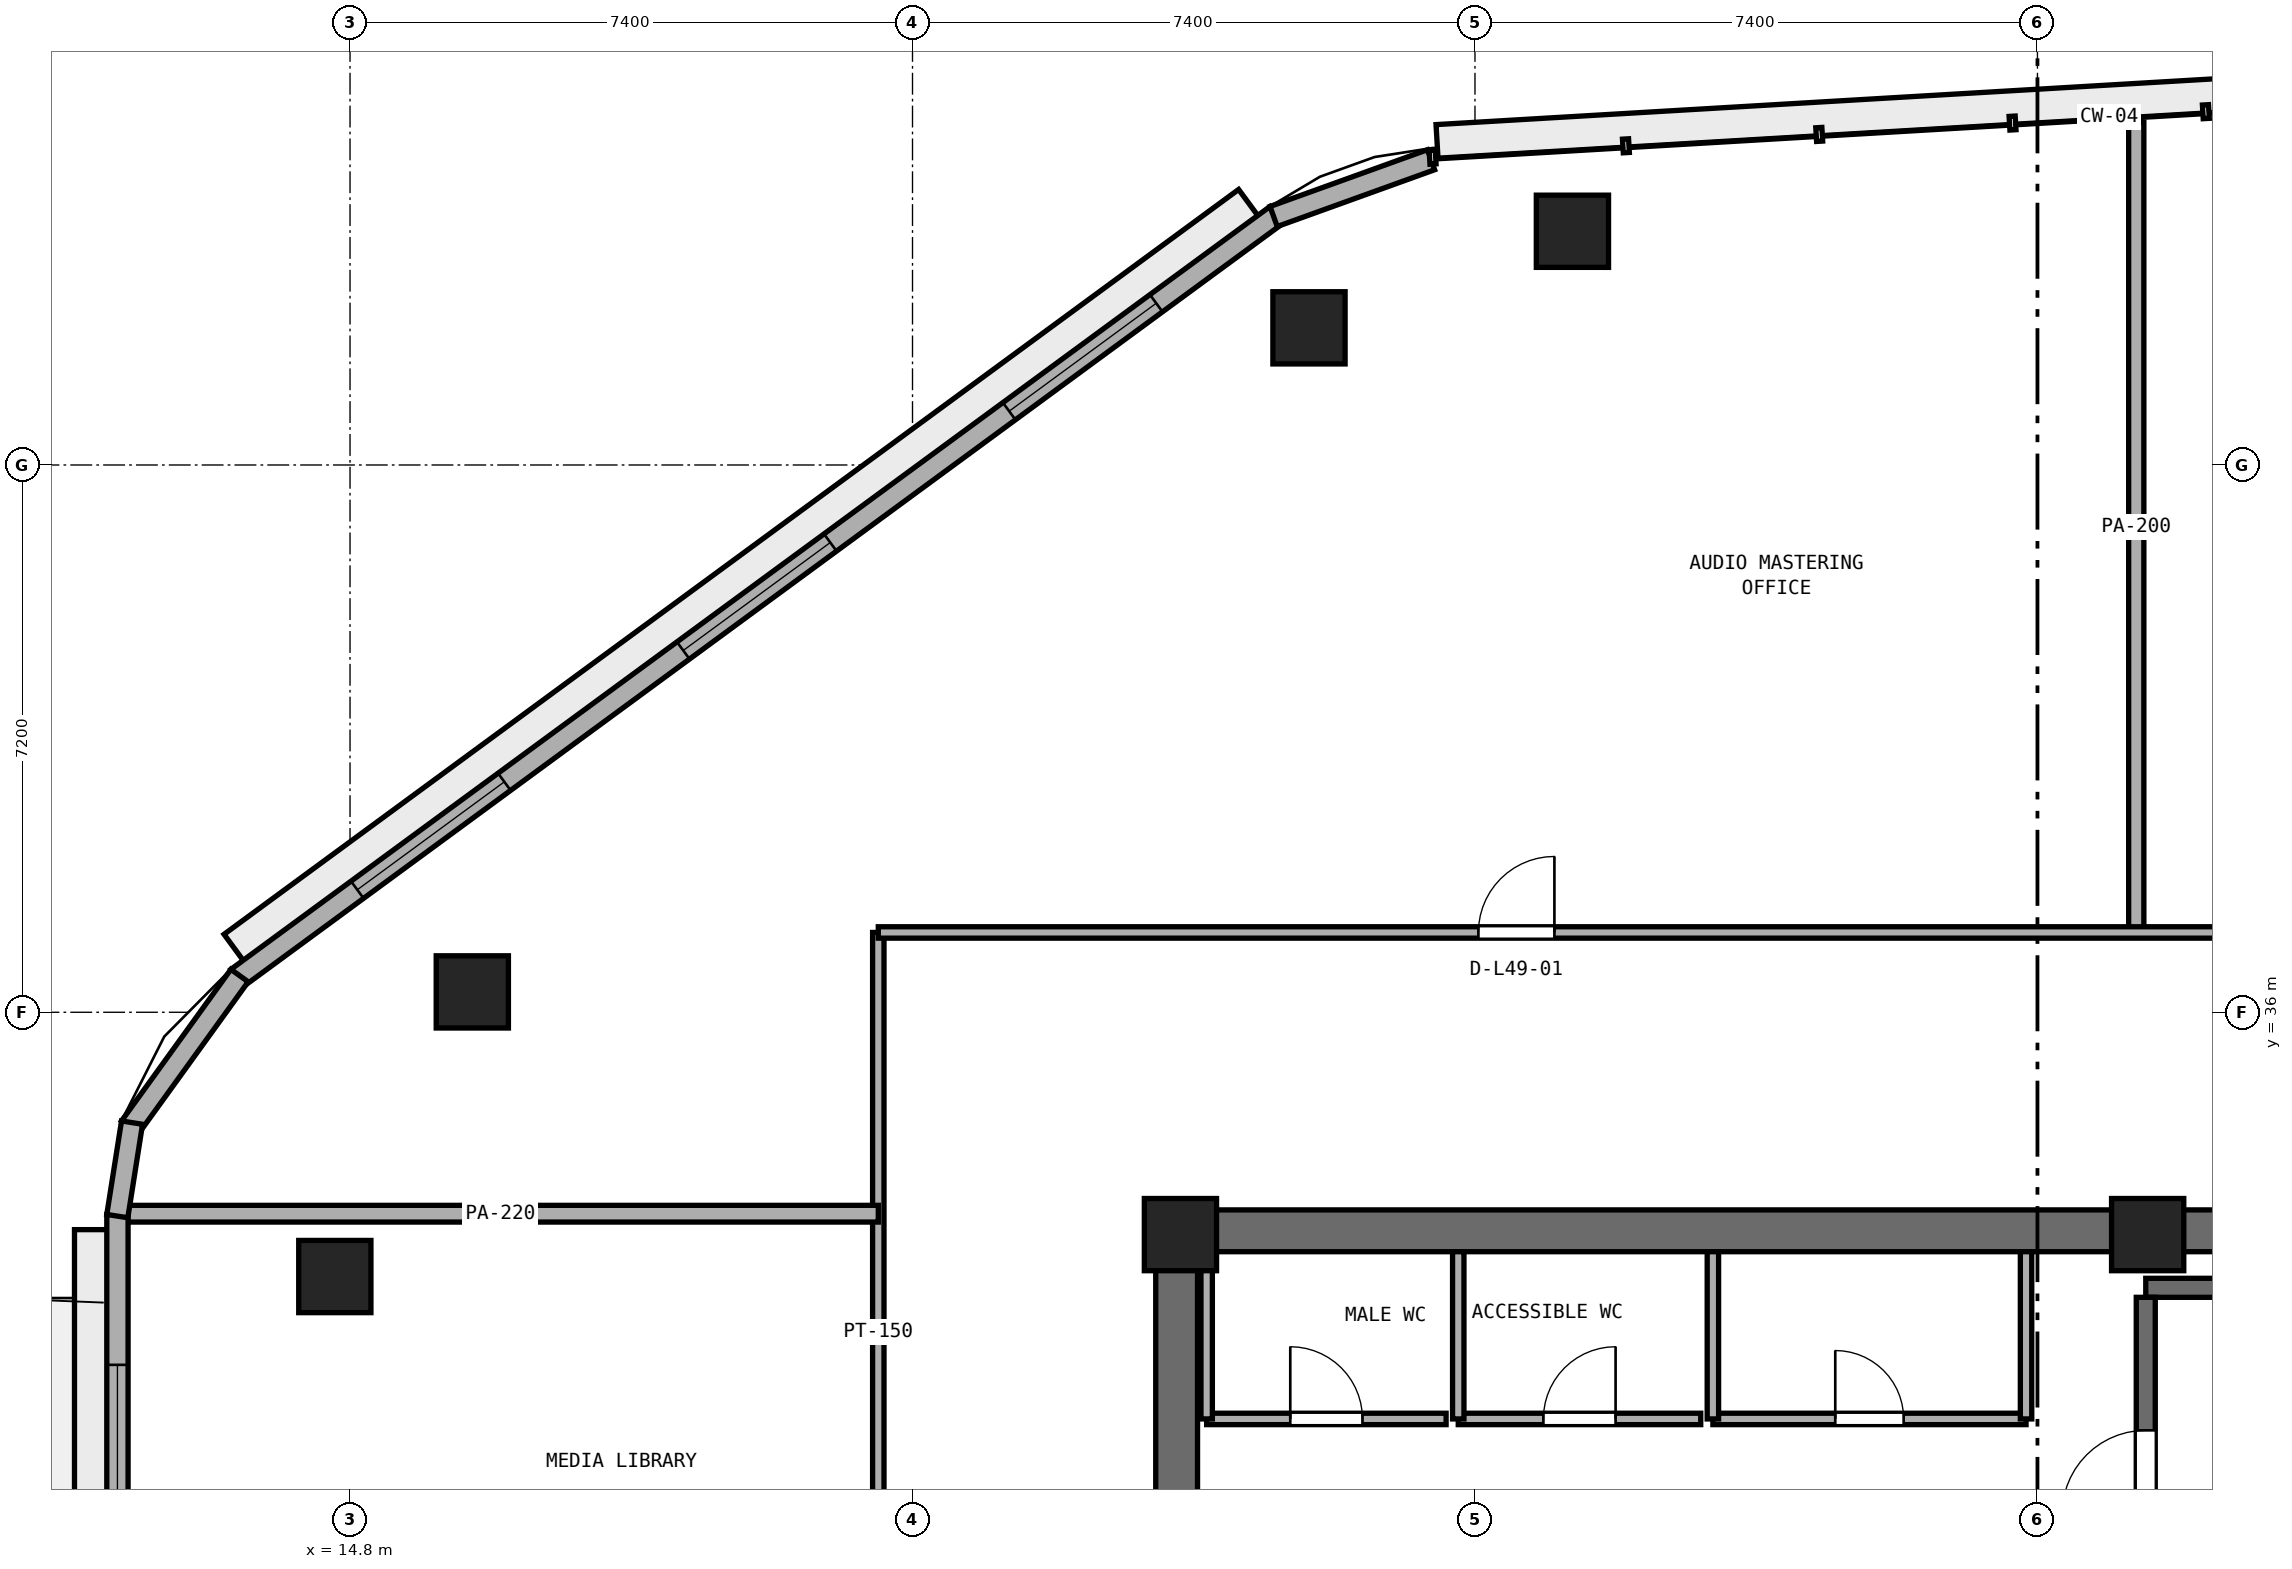
"""IFC4 building model, lengths in metres.
Left out: names, types, materials, properties, quantities, classifications, styles, units other than length and angle.
Written with IfcOpenShell. Run it as: python <this file> out.ifc"""

import sys

from ifc_helpers import new_model, si_unit, direction, frame, frame_2d, origin, origin_2d, place, context, subcontext, project, spatial, rectangle, extrude, element, fill, save


model = new_model("IFC4")
c1 = context("Model", 3, precision=1e-05, world=origin(), true_north=direction((0.0, 1.0)))
c2 = subcontext(c1, "Body", "Model", "MODEL_VIEW")
j1 = project(units=[si_unit("LENGTHUNIT", "METRE"), si_unit("PLANEANGLEUNIT", "RADIAN")], contexts=[c1])
p1 = place(None, origin())
s1 = spatial("IfcSite", under=j1, at=p1, CompositionType="ELEMENT")
p2 = place(p1, origin())
s2 = spatial("IfcBuilding", under=s1, at=p2, CompositionType="ELEMENT")
p3 = place(p2, frame((0.0, 0.0, 193.4)))
s3 = spatial("IfcBuildingStorey", under=s2, at=p3, CompositionType="ELEMENT", Elevation=193.4)
p4 = place(p3, frame((25.4, 33.125, 0.0), z_axis=(0.0, 0.0, 1.0), x_axis=(1.0, 0.0, 0.0)))
e1 = element("IfcWall", 1, at=p4, inside=s3, PredefinedType="SHEAR", context=c2, shape_type="SweptSolid", body=[
    extrude(rectangle(XDim=23.2, YDim=0.55, at=frame_2d((11.6, 0.0))), origin(), (0.0, 0.0, 1.0), 3.54),
])
p5 = place(p3, frame((25.675, 17.55, 0.0), z_axis=(0.0, 0.0, 1.0), x_axis=(0.0, 1.0, 0.0)))
e2 = element("IfcWall", 2, at=p5, inside=s3, PredefinedType="SHEAR", context=c2, shape_type="SweptSolid", body=[
    extrude(rectangle(XDim=15.3, YDim=0.55, at=frame_2d((7.65, 0.0))), origin(), (0.0, 0.0, 1.0), 3.54),
])
p6 = place(p5, frame((6.9, 0.0, 0.0)))
e3 = element("IfcOpeningElement", 3, at=p6, cuts=e2, PredefinedType="OPENING", context=c2, shape_type="SweptSolid", body=[
    extrude(rectangle(XDim=1.5, YDim=2.15, at=frame_2d((0.75, 1.075))), frame((0.0, 0.285, 0.0), z_axis=(0.0, -1.0, 0.0), x_axis=(1.0, 0.0, 0.0)), (0.0, 0.0, 1.0), 0.57),
])
for number, where, z_axis, x_axis in (
    (4, (38.45, 33.075, 0.0), (0.0, 0.0, 1.0), (1.0, 0.0, 0.0)),
    (5, (25.725, 33.075, 0.0), (0.0, 0.0, 1.0), (1.0, 0.0, 0.0)),
):
    element("IfcColumn", number, at=place(p3, frame(where, z_axis=z_axis, x_axis=x_axis)), inside=s3, PredefinedType="PILASTER", context=c2, shape_type="SweptSolid", body=[
        extrude(rectangle(XDim=0.95, YDim=0.95, at=origin_2d()), origin(), (0.0, 0.0, 1.0), 3.8),
    ])
for number, where, z_axis, x_axis in (
    (6, (30.882, 46.275, 0.0), (0.0, 0.0, 1.0), (1.0, 0.0, 0.0)),
    (7, (27.416, 45.004, 0.0), (0.0, 0.0, 1.0), (1.0, 0.0, 0.0)),
    (8, (16.409, 36.268, 0.0), (0.0, 0.0, 1.0), (1.0, 0.0, 0.0)),
    (9, (14.6, 32.523, 0.0), (0.0, 0.0, 1.0), (1.0, 0.0, 0.0)),
):
    element("IfcColumn", number, at=place(p3, frame(where, z_axis=z_axis, x_axis=x_axis)), inside=s3, PredefinedType="COLUMN", context=c2, shape_type="SweptSolid", body=[
        extrude(rectangle(XDim=0.95, YDim=0.95, at=origin_2d()), origin(), (0.0, 0.0, 1.0), 3.8),
    ])
p7 = place(p3, frame((38.425, 32.375, 0.0), z_axis=(0.0, 0.0, 1.0), x_axis=(1.0, 0.0, 0.0)))
e10 = element("IfcWall", 10, at=p7, inside=s3, PredefinedType="SHEAR", context=c2, shape_type="SweptSolid", body=[
    extrude(rectangle(XDim=7.3, YDim=0.25, at=frame_2d((3.65, 0.0))), origin(), (0.0, 0.0, 1.0), 3.54),
])
p8 = place(p3, frame((38.425, 29.05, 0.0), z_axis=(0.0, 0.0, 1.0), x_axis=(0.0, 1.0, 0.0)))
e11 = element("IfcWall", 11, at=p8, inside=s3, PredefinedType="SHEAR", context=c2, shape_type="SweptSolid", body=[
    extrude(rectangle(XDim=3.2, YDim=0.25, at=frame_2d((1.6, 0.0))), origin(), (0.0, 0.0, 1.0), 3.54),
])
p9 = place(p8, frame((0.35, 0.0, 0.0)))
e12 = element("IfcOpeningElement", 12, at=p9, cuts=e11, PredefinedType="OPENING", context=c2, shape_type="SweptSolid", body=[
    extrude(rectangle(XDim=1.1, YDim=2.15, at=frame_2d((0.55, 1.075))), frame((0.0, 0.135, 0.0), z_axis=(0.0, -1.0, 0.0), x_axis=(1.0, 0.0, 0.0)), (0.0, 0.0, 1.0), 0.27),
])
p10 = place(p3, frame((26.07, 30.65, 0.0), z_axis=(0.0, 0.0, 1.0), x_axis=(1.0, 0.0, 0.0)))
e13 = element("IfcWall", 13, at=p10, inside=s3, PredefinedType="PARTITIONING", context=c2, shape_type="SweptSolid", body=[
    extrude(rectangle(XDim=3.15, YDim=0.15, at=frame_2d((1.575, 0.0))), origin(), (0.0, 0.0, 1.0), 3.54),
])
p11 = place(p10, frame((1.1, 0.0, 0.0)))
e14 = element("IfcOpeningElement", 14, at=p11, cuts=e13, PredefinedType="OPENING", context=c2, shape_type="SweptSolid", body=[
    extrude(rectangle(XDim=0.95, YDim=2.1, at=frame_2d((0.475, 1.05))), frame((0.0, 0.085, 0.0), z_axis=(0.0, -1.0, 0.0), x_axis=(1.0, 0.0, 0.0)), (0.0, 0.0, 1.0), 0.17),
])
p12 = place(p3, frame((26.07, 30.65, 0.0), z_axis=(0.0, 0.0, 1.0), x_axis=(0.0, 1.0, 0.0)))
e15 = element("IfcWall", 15, at=p12, inside=s3, PredefinedType="PARTITIONING", context=c2, shape_type="SweptSolid", body=[
    extrude(rectangle(XDim=2.2, YDim=0.15, at=frame_2d((1.1, 0.0))), origin(), (0.0, 0.0, 1.0), 2.64),
])
p13 = place(p3, frame((29.38, 30.65, 0.0), z_axis=(0.0, 0.0, 1.0), x_axis=(1.0, 0.0, 0.0)))
e16 = element("IfcWall", 16, at=p13, inside=s3, PredefinedType="PARTITIONING", context=c2, shape_type="SweptSolid", body=[
    extrude(rectangle(XDim=3.19, YDim=0.15, at=frame_2d((1.595, 0.0))), origin(), (0.0, 0.0, 1.0), 3.54),
])
p14 = place(p13, frame((1.12, 0.0, 0.0)))
e17 = element("IfcOpeningElement", 17, at=p14, cuts=e16, PredefinedType="OPENING", context=c2, shape_type="SweptSolid", body=[
    extrude(rectangle(XDim=0.95, YDim=2.1, at=frame_2d((0.475, 1.05))), frame((0.0, 0.085, 0.0), z_axis=(0.0, -1.0, 0.0), x_axis=(1.0, 0.0, 0.0)), (0.0, 0.0, 1.0), 0.17),
])
p15 = place(p3, frame((29.38, 30.65, 0.0), z_axis=(0.0, 0.0, 1.0), x_axis=(0.0, 1.0, 0.0)))
e18 = element("IfcWall", 18, at=p15, inside=s3, PredefinedType="PARTITIONING", context=c2, shape_type="SweptSolid", body=[
    extrude(rectangle(XDim=2.2, YDim=0.15, at=frame_2d((1.1, 0.0))), origin(), (0.0, 0.0, 1.0), 3.54),
])
p16 = place(p3, frame((32.73, 30.65, 0.0), z_axis=(0.0, 0.0, 1.0), x_axis=(1.0, 0.0, 0.0)))
e19 = element("IfcWall", 19, at=p16, inside=s3, PredefinedType="PARTITIONING", context=c2, shape_type="SweptSolid", body=[
    extrude(rectangle(XDim=4.12, YDim=0.15, at=frame_2d((2.06, 0.0))), origin(), (0.0, 0.0, 1.0), 3.54),
])
p17 = place(p16, frame((1.61, 0.0, 0.0)))
e20 = element("IfcOpeningElement", 20, at=p17, cuts=e19, PredefinedType="OPENING", context=c2, shape_type="SweptSolid", body=[
    extrude(rectangle(XDim=0.9, YDim=2.1, at=frame_2d((0.45, 1.05))), frame((0.0, 0.085, 0.0), z_axis=(0.0, -1.0, 0.0), x_axis=(1.0, 0.0, 0.0)), (0.0, 0.0, 1.0), 0.17),
])
for number, where, z_axis, x_axis in (
    (21, (32.73, 30.65, 0.0), (0.0, 0.0, 1.0), (0.0, 1.0, 0.0)),
    (22, (36.85, 30.65, 0.0), (0.0, 0.0, 1.0), (0.0, 1.0, 0.0)),
):
    element("IfcWall", number, at=place(p3, frame(where, z_axis=z_axis, x_axis=x_axis)), inside=s3, PredefinedType="PARTITIONING", context=c2, shape_type="SweptSolid", body=[
        extrude(rectangle(XDim=2.2, YDim=0.15, at=frame_2d((1.1, 0.0))), origin(), (0.0, 0.0, 1.0), 3.54),
    ])
p18 = place(p3, frame((38.3, 37.05, 0.0), z_axis=(0.0, 0.0, 1.0), x_axis=(0.0, 1.0, 0.0)))
e23 = element("IfcWall", 23, at=p18, inside=s3, PredefinedType="PARTITIONING", context=c2, shape_type="SweptSolid", body=[
    extrude(rectangle(XDim=10.659, YDim=0.2, at=frame_2d((5.33, 0.0))), origin(), (0.0, 0.0, 1.0), 3.54),
])
p19 = place(p3, frame((21.75, 26.55, 0.0), z_axis=(0.0, 0.0, 1.0), x_axis=(0.0, 1.0, 0.0)))
e24 = element("IfcWall", 24, at=p19, inside=s3, PredefinedType="PARTITIONING", context=c2, shape_type="SweptSolid", body=[
    extrude(rectangle(XDim=10.5, YDim=0.15, at=frame_2d((5.25, 0.0))), origin(), (0.0, 0.0, 1.0), 3.54),
])
p20 = place(p3, frame((11.806, 33.35, 0.0), z_axis=(0.0, 0.0, 1.0), x_axis=(1.0, 0.0, 0.0)))
e25 = element("IfcWall", 25, at=p20, inside=s3, PredefinedType="PARTITIONING", context=c2, shape_type="SweptSolid", body=[
    extrude(rectangle(XDim=9.944, YDim=0.22, at=frame_2d((4.972, 0.0))), origin(), (0.0, 0.0, 1.0), 3.54),
])
p21 = place(p3, frame((21.75, 37.05, 0.0), z_axis=(0.0, 0.0, 1.0), x_axis=(1.0, 0.0, 0.0)))
e26 = element("IfcWall", 26, at=p21, inside=s3, PredefinedType="PARTITIONING", context=c2, shape_type="SweptSolid", body=[
    extrude(rectangle(XDim=30.5, YDim=0.15, at=frame_2d((15.25, 0.0))), origin(), (0.0, 0.0, 1.0), 3.54),
])
p22 = place(p21, frame((7.895, 0.0, 0.0)))
e27 = element("IfcOpeningElement", 27, at=p22, cuts=e26, PredefinedType="OPENING", context=c2, shape_type="SweptSolid", body=[
    extrude(rectangle(XDim=1.0, YDim=2.12, at=frame_2d((0.5, 1.06))), frame((0.0, 0.085, 0.0), z_axis=(0.0, -1.0, 0.0), x_axis=(1.0, 0.0, 0.0)), (0.0, 0.0, 1.0), 0.17),
])
p23 = place(p21, frame((22.905, 0.0, 0.0)))
e28 = element("IfcOpeningElement", 28, at=p23, cuts=e26, PredefinedType="OPENING", context=c2, shape_type="SweptSolid", body=[
    extrude(rectangle(XDim=1.0, YDim=2.12, at=frame_2d((0.5, 1.06))), frame((0.0, 0.085, 0.0), z_axis=(0.0, -1.0, 0.0), x_axis=(1.0, 0.0, 0.0)), (0.0, 0.0, 1.0), 0.17),
])
p24 = place(p3, frame((26.986, 46.488, 0.0), z_axis=(0.0, 0.0, 1.0), x_axis=(-0.806097783211, -0.59178236194, 0.0)))
e29 = element("IfcWall", 29, at=p24, inside=s3, PredefinedType="STANDARD", context=c2, shape_type="SweptSolid", body=[
    extrude(rectangle(XDim=16.959, YDim=0.28, at=frame_2d((8.479, 0.0))), origin(), (0.0, 0.0, 1.0), 3.54),
])
p25 = place(p24, frame((1.96, 0.0, 0.9)))
e30 = element("IfcOpeningElement", 30, at=p25, cuts=e29, PredefinedType="OPENING", context=c2, shape_type="SweptSolid", body=[
    extrude(rectangle(XDim=2.4, YDim=1.75, at=frame_2d((1.2, 0.875))), frame((0.0, 0.15, 0.0), z_axis=(0.0, -1.0, 0.0), x_axis=(1.0, 0.0, 0.0)), (0.0, 0.0, 1.0), 0.3),
])
p26 = place(p24, frame((7.279, 0.0, 0.9)))
e31 = element("IfcOpeningElement", 31, at=p26, cuts=e29, PredefinedType="OPENING", context=c2, shape_type="SweptSolid", body=[
    extrude(rectangle(XDim=2.4, YDim=1.75, at=frame_2d((1.2, 0.875))), frame((0.0, 0.15, 0.0), z_axis=(0.0, -1.0, 0.0), x_axis=(1.0, 0.0, 0.0)), (0.0, 0.0, 1.0), 0.3),
])
p27 = place(p24, frame((12.599, 0.0, 0.9)))
e32 = element("IfcOpeningElement", 32, at=p27, cuts=e29, PredefinedType="OPENING", context=c2, shape_type="SweptSolid", body=[
    extrude(rectangle(XDim=2.4, YDim=1.75, at=frame_2d((1.2, 0.875))), frame((0.0, 0.15, 0.0), z_axis=(0.0, -1.0, 0.0), x_axis=(1.0, 0.0, 0.0)), (0.0, 0.0, 1.0), 0.3),
])
p28 = place(p3, frame((11.74, 33.34, 0.0), z_axis=(0.0, 0.0, 1.0), x_axis=(0.0, -1.0, 0.0)))
e33 = element("IfcWall", 33, at=p28, inside=s3, PredefinedType="STANDARD", context=c2, shape_type="SweptSolid", body=[
    extrude(rectangle(XDim=17.073, YDim=0.28, at=frame_2d((8.536, 0.0))), origin(), (0.0, 0.0, 1.0), 3.54),
])
p29 = place(p28, frame((7.986, 0.0, 0.0)))
e34 = element("IfcOpeningElement", 34, at=p29, cuts=e33, PredefinedType="OPENING", context=c2, shape_type="SweptSolid", body=[
    extrude(rectangle(XDim=1.1, YDim=2.2, at=frame_2d((0.55, 1.1))), frame((0.0, 0.15, 0.0), z_axis=(0.0, -1.0, 0.0), x_axis=(1.0, 0.0, 0.0)), (0.0, 0.0, 1.0), 0.3),
])
p30 = place(p28, frame((1.979, 0.0, 0.9)))
e35 = element("IfcOpeningElement", 35, at=p30, cuts=e33, PredefinedType="OPENING", context=c2, shape_type="SweptSolid", body=[
    extrude(rectangle(XDim=2.4, YDim=1.75, at=frame_2d((1.2, 0.875))), frame((0.0, 0.15, 0.0), z_axis=(0.0, -1.0, 0.0), x_axis=(1.0, 0.0, 0.0)), (0.0, 0.0, 1.0), 0.3),
])
p31 = place(p28, frame((12.694, 0.0, 0.9)))
e36 = element("IfcOpeningElement", 36, at=p31, cuts=e33, PredefinedType="OPENING", context=c2, shape_type="SweptSolid", body=[
    extrude(rectangle(XDim=2.4, YDim=1.75, at=frame_2d((1.2, 0.875))), frame((0.0, 0.15, 0.0), z_axis=(0.0, -1.0, 0.0), x_axis=(1.0, 0.0, 0.0)), (0.0, 0.0, 1.0), 0.3),
])
p32 = place(p3, frame((29.022, 47.216, 0.0), z_axis=(0.0, 0.0, 1.0), x_axis=(-0.940706330201, -0.339222051643, 0.0)))
e37 = element("IfcWall", 37, at=p32, inside=s3, PredefinedType="STANDARD", context=c2, shape_type="SweptSolid", body=[
    extrude(rectangle(XDim=2.202, YDim=0.28, at=frame_2d((1.101, 0.0))), origin(), (0.0, 0.0, 1.0), 3.54),
])
p33 = place(p3, frame((13.346, 36.483, 0.0), z_axis=(0.0, 0.0, 1.0), x_axis=(-0.585128091556, -0.810940883463, 0.0)))
e38 = element("IfcWall", 38, at=p33, inside=s3, PredefinedType="STANDARD", context=c2, shape_type="SweptSolid", body=[
    extrude(rectangle(XDim=2.46, YDim=0.28, at=frame_2d((1.23, 0.0))), origin(), (0.0, 0.0, 1.0), 3.54),
])
p34 = place(p3, frame((11.932, 34.548, 0.0), z_axis=(0.0, 0.0, 1.0), x_axis=(-0.155519443181, -0.987832831401, 0.0)))
e39 = element("IfcWall", 39, at=p34, inside=s3, PredefinedType="STANDARD", context=c2, shape_type="SweptSolid", body=[
    extrude(rectangle(XDim=1.245, YDim=0.28, at=frame_2d((0.623, 0.0))), origin(), (0.0, 0.0, 1.0), 3.54),
])
p35 = place(p9, origin())
e40 = element("IfcDoor", 40, at=p35, inside=s3, OperationType="SINGLE_SWING_LEFT", PredefinedType="DOOR", context=c2, shape_type="SweptSolid", body=[
    extrude(rectangle(XDim=1.1, YDim=2.15, at=frame_2d((0.55, 1.075))), frame((0.0, 0.025, 0.0), z_axis=(0.0, -1.0, 0.0), x_axis=(1.0, 0.0, 0.0)), (0.0, 0.0, 1.0), 0.05),
])
fill(e12, e40)
p36 = place(p11, origin())
e41 = element("IfcDoor", 41, at=p36, inside=s3, OperationType="SINGLE_SWING_LEFT", PredefinedType="DOOR", context=c2, shape_type="SweptSolid", body=[
    extrude(rectangle(XDim=0.95, YDim=2.1, at=frame_2d((0.475, 1.05))), frame((0.0, 0.025, 0.0), z_axis=(0.0, -1.0, 0.0), x_axis=(1.0, 0.0, 0.0)), (0.0, 0.0, 1.0), 0.05),
])
fill(e14, e41)
p37 = place(p14, origin())
e42 = element("IfcDoor", 42, at=p37, inside=s3, OperationType="SINGLE_SWING_RIGHT", PredefinedType="DOOR", context=c2, shape_type="SweptSolid", body=[
    extrude(rectangle(XDim=0.95, YDim=2.1, at=frame_2d((0.475, 1.05))), frame((0.0, 0.025, 0.0), z_axis=(0.0, -1.0, 0.0), x_axis=(1.0, 0.0, 0.0)), (0.0, 0.0, 1.0), 0.05),
])
fill(e17, e42)
p38 = place(p17, origin())
e43 = element("IfcDoor", 43, at=p38, inside=s3, OperationType="SINGLE_SWING_LEFT", PredefinedType="DOOR", context=c2, shape_type="SweptSolid", body=[
    extrude(rectangle(XDim=0.9, YDim=2.1, at=frame_2d((0.45, 1.05))), frame((0.0, 0.025, 0.0), z_axis=(0.0, -1.0, 0.0), x_axis=(1.0, 0.0, 0.0)), (0.0, 0.0, 1.0), 0.05),
])
fill(e20, e43)
p39 = place(p22, origin())
e44 = element("IfcDoor", 44, at=p39, inside=s3, OperationType="SINGLE_SWING_RIGHT", PredefinedType="DOOR", context=c2, shape_type="SweptSolid", body=[
    extrude(rectangle(XDim=1.0, YDim=2.12, at=frame_2d((0.5, 1.06))), frame((0.0, 0.025, 0.0), z_axis=(0.0, -1.0, 0.0), x_axis=(1.0, 0.0, 0.0)), (0.0, 0.0, 1.0), 0.05),
])
fill(e27, e44)
p40 = place(p25, origin())
e45 = element("IfcWindow", 45, at=p40, inside=s3, PartitioningType="SINGLE_PANEL", PredefinedType="WINDOW", context=c2, shape_type="SweptSolid", body=[
    extrude(rectangle(XDim=2.4, YDim=1.75, at=frame_2d((1.2, 0.875))), frame((0.0, 0.03, 0.0), z_axis=(0.0, -1.0, 0.0), x_axis=(1.0, 0.0, 0.0)), (0.0, 0.0, 1.0), 0.06),
])
fill(e30, e45)
p41 = place(p26, origin())
e46 = element("IfcWindow", 46, at=p41, inside=s3, PartitioningType="SINGLE_PANEL", PredefinedType="WINDOW", context=c2, shape_type="SweptSolid", body=[
    extrude(rectangle(XDim=2.4, YDim=1.75, at=frame_2d((1.2, 0.875))), frame((0.0, 0.03, 0.0), z_axis=(0.0, -1.0, 0.0), x_axis=(1.0, 0.0, 0.0)), (0.0, 0.0, 1.0), 0.06),
])
fill(e31, e46)
p42 = place(p27, origin())
e47 = element("IfcWindow", 47, at=p42, inside=s3, PartitioningType="SINGLE_PANEL", PredefinedType="WINDOW", context=c2, shape_type="SweptSolid", body=[
    extrude(rectangle(XDim=2.4, YDim=1.75, at=frame_2d((1.2, 0.875))), frame((0.0, 0.03, 0.0), z_axis=(0.0, -1.0, 0.0), x_axis=(1.0, 0.0, 0.0)), (0.0, 0.0, 1.0), 0.06),
])
fill(e32, e47)
p43 = place(p30, origin())
e48 = element("IfcWindow", 48, at=p43, inside=s3, PartitioningType="SINGLE_PANEL", PredefinedType="WINDOW", context=c2, shape_type="SweptSolid", body=[
    extrude(rectangle(XDim=2.4, YDim=1.75, at=frame_2d((1.2, 0.875))), frame((0.0, 0.03, 0.0), z_axis=(0.0, -1.0, 0.0), x_axis=(1.0, 0.0, 0.0)), (0.0, 0.0, 1.0), 0.06),
])
fill(e35, e48)
save(model, sys.argv[1])
